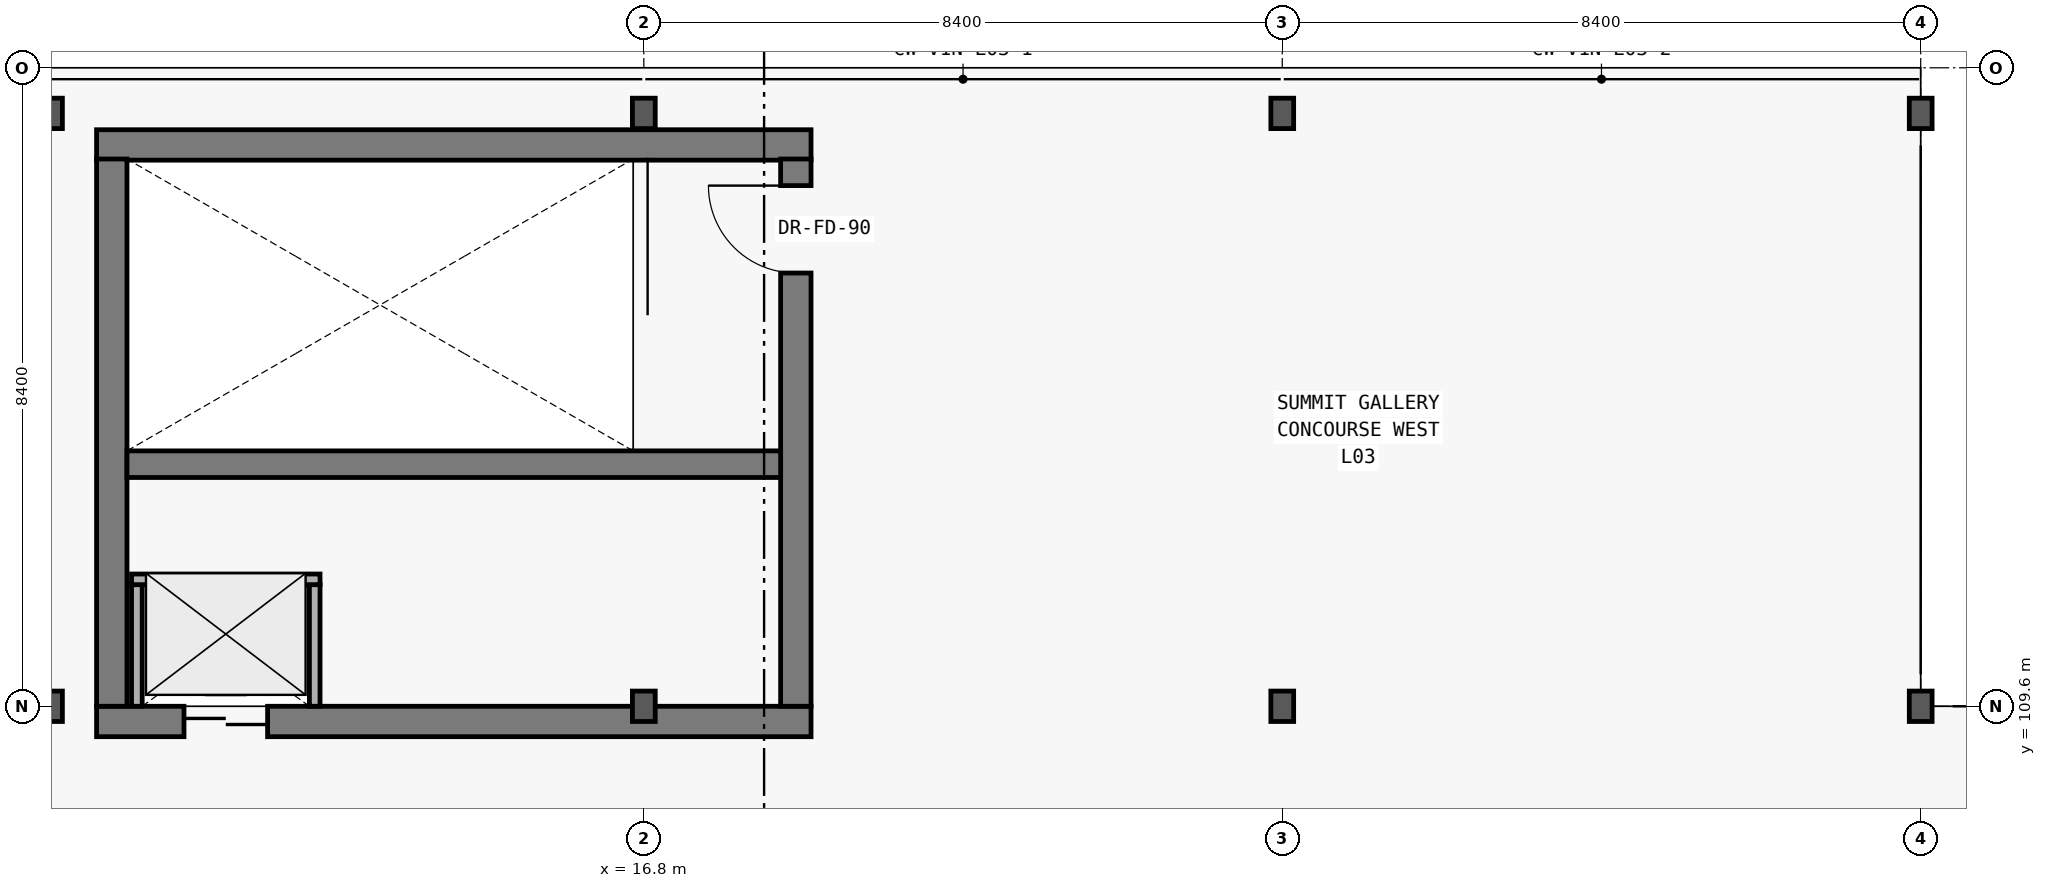
"""IFC4 building model, lengths in metres.
Left out: names, types, materials, properties, quantities, classifications, styles, units other than length and angle.
Written with IfcOpenShell. Run it as: python <this file> out.ifc"""

import sys

from ifc_helpers import new_model, si_unit, direction, frame, frame_2d, origin, origin_2d, place, context, subcontext, project, spatial, rectangle, i_section, extrude, element, fill, save


model = new_model("IFC4")
c1 = context("Model", 3, precision=1e-05, world=origin(), true_north=direction((0.0, 1.0)))
c2 = subcontext(c1, "Body", "Model", "MODEL_VIEW")
j1 = project(units=[si_unit("LENGTHUNIT", "METRE"), si_unit("PLANEANGLEUNIT", "RADIAN")], contexts=[c1])
p1 = place(None, origin())
s1 = spatial("IfcSite", under=j1, at=p1, CompositionType="ELEMENT")
p2 = place(p1, origin())
s2 = spatial("IfcBuilding", under=s1, at=p2, CompositionType="ELEMENT")
p3 = place(p2, frame((0.0, 0.0, 15.0)))
s3 = spatial("IfcBuildingStorey", under=s2, at=p3, CompositionType="ELEMENT", Elevation=15.0)
for number, where, z_axis, x_axis in (
    (1, (9.0, 109.6, 0.0), (0.0, 0.0, 1.0), (1.0, 0.0, 0.0)),
    (2, (9.0, 117.4, 0.0), (0.0, 0.0, 1.0), (1.0, 0.0, 0.0)),
    (3, (16.8, 109.6, 0.0), (0.0, 0.0, 1.0), (1.0, 0.0, 0.0)),
    (4, (16.8, 117.4, 0.0), (0.0, 0.0, 1.0), (1.0, 0.0, 0.0)),
    (5, (25.2, 109.6, 0.0), (0.0, 0.0, 1.0), (1.0, 0.0, 0.0)),
    (6, (25.2, 117.4, 0.0), (0.0, 0.0, 1.0), (1.0, 0.0, 0.0)),
    (7, (33.6, 109.6, 0.0), (0.0, 0.0, 1.0), (1.0, 0.0, 0.0)),
    (8, (33.6, 117.4, 0.0), (0.0, 0.0, 1.0), (1.0, 0.0, 0.0)),
):
    element("IfcColumn", number, at=place(p3, frame(where, z_axis=z_axis, x_axis=x_axis)), inside=s3, PredefinedType="COLUMN", context=c2, shape_type="SweptSolid", body=[
        extrude(i_section(OverallWidth=0.3, OverallDepth=0.4, WebThickness=0.013, FlangeThickness=0.024, at=origin_2d()), origin(), (0.0, 0.0, 1.0), 4.2),
    ])
p4 = place(p3, frame((9.6, 109.4, 0.0), z_axis=(0.0, 0.0, 1.0), x_axis=(1.0, 0.0, 0.0)))
e9 = element("IfcWall", 9, at=p4, inside=s3, PredefinedType="SHEAR", context=c2, shape_type="SweptSolid", body=[
    extrude(rectangle(XDim=9.4, YDim=0.4, at=frame_2d((4.7, 0.0))), origin(), (0.0, 0.0, 1.0), 3.92),
])
p5 = place(p4, frame((1.15, 0.0, 0.0)))
e10 = element("IfcOpeningElement", 10, at=p5, cuts=e9, PredefinedType="OPENING", context=c2, shape_type="SweptSolid", body=[
    extrude(rectangle(XDim=1.1, YDim=2.2, at=frame_2d((0.55, 1.1))), frame((0.0, 0.21, 0.0), z_axis=(0.0, -1.0, 0.0), x_axis=(1.0, 0.0, 0.0)), (0.0, 0.0, 1.0), 0.42),
])
p6 = place(p3, frame((19.0, 116.985, 0.0), z_axis=(0.0, 0.0, 1.0), x_axis=(-1.0, 0.0, 0.0)))
e11 = element("IfcWall", 11, at=p6, inside=s3, PredefinedType="SHEAR", context=c2, shape_type="SweptSolid", body=[
    extrude(rectangle(XDim=9.4, YDim=0.4, at=frame_2d((4.7, 0.0))), origin(), (0.0, 0.0, 1.0), 3.92),
])
p7 = place(p3, frame((9.8, 116.8, 0.0), z_axis=(0.0, 0.0, 1.0), x_axis=(0.0, -1.0, 0.0)))
e12 = element("IfcWall", 12, at=p7, inside=s3, PredefinedType="SHEAR", context=c2, shape_type="SweptSolid", body=[
    extrude(rectangle(XDim=7.2, YDim=0.4, at=frame_2d((3.6, 0.0))), origin(), (0.0, 0.0, 1.0), 3.92),
])
p8 = place(p3, frame((18.8, 109.6, 0.0), z_axis=(0.0, 0.0, 1.0), x_axis=(0.0, 1.0, 0.0)))
e13 = element("IfcWall", 13, at=p8, inside=s3, PredefinedType="SHEAR", context=c2, shape_type="SweptSolid", body=[
    extrude(rectangle(XDim=7.2, YDim=0.4, at=frame_2d((3.6, 0.0))), origin(), (0.0, 0.0, 1.0), 3.92),
])
p9 = place(p8, frame((5.7, 0.0, 0.0)))
e14 = element("IfcOpeningElement", 14, at=p9, cuts=e13, PredefinedType="OPENING", context=c2, shape_type="SweptSolid", body=[
    extrude(rectangle(XDim=1.15, YDim=2.2, at=frame_2d((0.575, 1.1))), frame((0.0, 0.21, 0.0), z_axis=(0.0, -1.0, 0.0), x_axis=(1.0, 0.0, 0.0)), (0.0, 0.0, 1.0), 0.42),
])
p10 = place(p3, frame((10.0, 112.785, 0.0), z_axis=(0.0, 0.0, 1.0), x_axis=(1.0, 0.0, 0.0)))
e15 = element("IfcWall", 15, at=p10, inside=s3, PredefinedType="SHEAR", context=c2, shape_type="SweptSolid", body=[
    extrude(rectangle(XDim=8.6, YDim=0.35, at=frame_2d((4.3, 0.0))), origin(), (0.0, 0.0, 1.0), 3.92),
])
for number, where, z_axis, x_axis in (
    (16, (10.13, 109.6, 0.0), (0.0, 0.0, 1.0), (0.0, 1.0, 0.0)),
    (17, (12.47, 109.6, 0.0), (0.0, 0.0, 1.0), (0.0, 1.0, 0.0)),
):
    element("IfcWall", number, at=place(p3, frame(where, z_axis=z_axis, x_axis=x_axis)), inside=s3, PredefinedType="PARTITIONING", context=c2, shape_type="SweptSolid", body=[
        extrude(rectangle(XDim=1.6, YDim=0.14, at=frame_2d((0.8, 0.0))), origin(), (0.0, 0.0, 1.0), 3.07),
    ])
p11 = place(p3, frame((10.06, 111.27, 0.0), z_axis=(0.0, 0.0, 1.0), x_axis=(1.0, 0.0, 0.0)))
e18 = element("IfcWall", 18, at=p11, inside=s3, PredefinedType="PARTITIONING", context=c2, shape_type="SweptSolid", body=[
    extrude(rectangle(XDim=2.48, YDim=0.14, at=frame_2d((1.24, 0.0))), origin(), (0.0, 0.0, 1.0), 3.07),
])
p12 = place(p9, origin())
e19 = element("IfcDoor", 19, at=p12, inside=s3, OperationType="SINGLE_SWING_RIGHT", PredefinedType="DOOR", context=c2, shape_type="SweptSolid", body=[
    extrude(rectangle(XDim=1.15, YDim=2.2, at=frame_2d((0.575, 1.1))), frame((0.0, 0.025, 0.0), z_axis=(0.0, -1.0, 0.0), x_axis=(1.0, 0.0, 0.0)), (0.0, 0.0, 1.0), 0.05),
])
fill(e14, e19)
p13 = place(p5, origin())
e20 = element("IfcDoor", 20, at=p13, inside=s3, OperationType="DOUBLE_DOOR_SLIDING", PredefinedType="DOOR", context=c2, shape_type="SweptSolid", body=[
    extrude(rectangle(XDim=1.1, YDim=2.2, at=frame_2d((0.55, 1.1))), frame((0.0, 0.025, 0.0), z_axis=(0.0, -1.0, 0.0), x_axis=(1.0, 0.0, 0.0)), (0.0, 0.0, 1.0), 0.05),
])
fill(e10, e20)
save(model, sys.argv[1])
